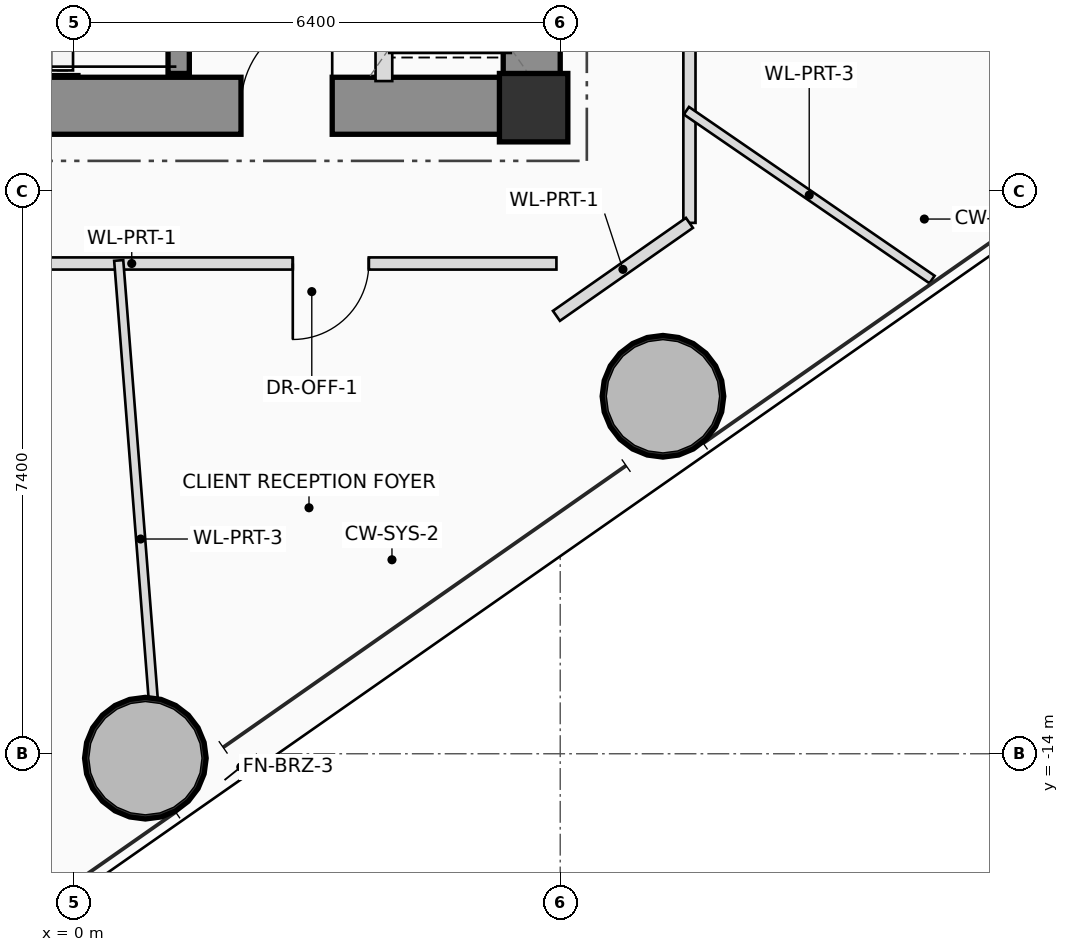
"""IFC4 building model, lengths in metres.
Left out: names, types, materials, properties, quantities, classifications, styles, units other than length and angle.
Written with IfcOpenShell. Run it as: python <this file> out.ifc"""

import sys

from ifc_helpers import new_model, si_unit, direction, frame, frame_2d, origin, origin_2d, place, context, subcontext, project, spatial, rectangle, hollow_circle, extrude, source, transform, mapped, element, fill, save


model = new_model("IFC4")
c1 = context("Model", 3, precision=1e-05, world=origin(), true_north=direction((0.0, 1.0)))
c2 = subcontext(c1, "Body", "Model", "MODEL_VIEW")
j1 = project(units=[si_unit("LENGTHUNIT", "METRE"), si_unit("PLANEANGLEUNIT", "RADIAN")], contexts=[c1])
p1 = place(None, origin())
s1 = spatial("IfcSite", under=j1, at=p1, CompositionType="ELEMENT")
p2 = place(p1, origin())
s2 = spatial("IfcBuilding", under=s1, at=p2, CompositionType="ELEMENT")
p3 = place(p2, frame((0.0, 0.0, 73.55)))
s3 = spatial("IfcBuildingStorey", under=s2, at=p3, CompositionType="ELEMENT", Elevation=73.55)
m1 = source(origin(), c2, "Body", "SweptSolid", [
    extrude(rectangle(XDim=0.9, YDim=0.9, at=origin_2d()), origin(), (0.0, 0.0, 1.0), 3.75),
])
p4 = place(p3, frame((6.05, -5.5, 0.0), z_axis=(0.0, 0.0, 1.0), x_axis=(1.0, 0.0, 0.0)))
e1 = element("IfcColumn", 1, at=p4, inside=s3, PredefinedType="COLUMN", context=c2, shape_type="MappedRepresentation", body=[
    mapped(m1, transform((0.0, 0.0, 0.0), scale=1.0)),
])
p5 = place(p3, frame((-6.4, -5.475, 0.0), z_axis=(0.0, 0.0, 1.0), x_axis=(1.0, 0.0, 0.0)))
e2 = element("IfcWall", 2, at=p5, inside=s3, PredefinedType="SHEAR", context=c2, shape_type="SweptSolid", body=[
    extrude(rectangle(XDim=12.8, YDim=0.75, at=frame_2d((6.4, 0.0))), origin(), (0.0, 0.0, 1.0), 3.75),
])
p6 = place(p5, frame((8.6, 0.0, 0.0)))
e3 = element("IfcOpeningElement", 3, at=p6, cuts=e2, PredefinedType="OPENING", context=c2, shape_type="SweptSolid", body=[
    extrude(rectangle(XDim=1.2, YDim=2.2, at=frame_2d((0.6, 1.1))), frame((0.0, 0.385, 0.0), z_axis=(0.0, -1.0, 0.0), x_axis=(1.0, 0.0, 0.0)), (0.0, 0.0, 1.0), 0.77),
])
p7 = place(p3, frame((6.025, -5.1, 0.0), z_axis=(0.0, 0.0, 1.0), x_axis=(0.0, 1.0, 0.0)))
e4 = element("IfcWall", 4, at=p7, inside=s3, PredefinedType="SHEAR", context=c2, shape_type="SweptSolid", body=[
    extrude(rectangle(XDim=10.2, YDim=0.75, at=frame_2d((5.1, 0.0))), origin(), (0.0, 0.0, 1.0), 3.75),
])
p8 = place(p3, frame((1.38, -5.05, 0.0), z_axis=(0.0, 0.0, 1.0), x_axis=(0.0, 1.0, 0.0)))
e5 = element("IfcWall", 5, at=p8, inside=s3, PredefinedType="SHEAR", context=c2, shape_type="SweptSolid", body=[
    extrude(rectangle(XDim=0.8, YDim=0.28, at=frame_2d((0.4, 0.0))), origin(), (0.0, 0.0, 1.0), 3.75),
])
m2 = source(origin(), c2, "Body", "SweptSolid", [
    extrude(hollow_circle(Radius=0.8, WallThickness=0.055, at=origin_2d()), origin(), (0.0, 0.0, 1.0), 3.75),
])
for number, where, z_axis, x_axis in (
    (6, (0.942, -14.058, 0.0), (0.0, 0.0, 1.0), (1.0, 0.0, 0.0)),
    (7, (7.752, -9.297, 0.0), (0.0, 0.0, 1.0), (1.0, 0.0, 0.0)),
):
    element("IfcColumn", number, at=place(p3, frame(where, z_axis=z_axis, x_axis=x_axis)), inside=s3, PredefinedType="COLUMN", context=c2, shape_type="MappedRepresentation", body=[
        mapped(m2, transform((0.0, 0.0, 0.0), scale=1.0)),
    ])
p9 = place(p3, frame((4.08, -5.15, 0.0), z_axis=(0.0, 0.0, 1.0), x_axis=(0.0, 1.0, 0.0)))
e8 = element("IfcWall", 8, at=p9, inside=s3, PredefinedType="PLUMBINGWALL", context=c2, shape_type="SweptSolid", body=[
    extrude(rectangle(XDim=2.95, YDim=0.22, at=frame_2d((1.475, 0.0))), origin(), (0.0, 0.0, 1.0), 3.545),
])
p10 = place(p9, frame((0.95, 0.0, 0.0)))
e9 = element("IfcOpeningElement", 9, at=p10, cuts=e8, PredefinedType="OPENING", context=c2, shape_type="SweptSolid", body=[
    extrude(rectangle(XDim=1.2, YDim=2.25, at=frame_2d((0.6, 1.125))), frame((0.0, 0.12, 0.0), z_axis=(0.0, -1.0, 0.0), x_axis=(1.0, 0.0, 0.0)), (0.0, 0.0, 1.0), 0.24),
])
p11 = place(p3, frame((8.1, -0.02, 0.0), z_axis=(0.0, 0.0, 1.0), x_axis=(0.0, -1.0, 0.0)))
e10 = element("IfcWall", 10, at=p11, inside=s3, PredefinedType="PARTITIONING", context=c2, shape_type="SweptSolid", body=[
    extrude(rectangle(XDim=6.995, YDim=0.16, at=frame_2d((3.498, 0.0))), origin(), (0.0, 0.0, 1.0), 2.85),
])
p12 = place(p3, frame((8.1, -7.015, 0.0), z_axis=(0.0, 0.0, 1.0), x_axis=(-0.81953260104, -0.573032560883, 0.0)))
e11 = element("IfcWall", 11, at=p12, inside=s3, PredefinedType="PARTITIONING", context=c2, shape_type="SweptSolid", body=[
    extrude(rectangle(XDim=2.135, YDim=0.16, at=frame_2d((1.068, 0.0))), origin(), (0.0, 0.0, 1.0), 2.85),
])
p13 = place(p3, frame((6.35, -7.55, 0.0), z_axis=(0.0, 0.0, 1.0), x_axis=(-1.0, 0.0, 0.0)))
e12 = element("IfcWall", 12, at=p13, inside=s3, PredefinedType="PARTITIONING", context=c2, shape_type="SweptSolid", body=[
    extrude(rectangle(XDim=12.7, YDim=0.16, at=frame_2d((6.35, 0.0))), origin(), (0.0, 0.0, 1.0), 2.85),
])
p14 = place(p13, frame((2.469, 0.0, 0.0)))
e13 = element("IfcOpeningElement", 13, at=p14, cuts=e12, PredefinedType="OPENING", context=c2, shape_type="SweptSolid", body=[
    extrude(rectangle(XDim=1.0, YDim=2.25, at=frame_2d((0.5, 1.125))), frame((0.0, 0.09, 0.0), z_axis=(0.0, -1.0, 0.0), x_axis=(1.0, 0.0, 0.0)), (0.0, 0.0, 1.0), 0.18),
])
p15 = place(p13, frame((7.707, 0.0, 0.0)))
e14 = element("IfcOpeningElement", 14, at=p15, cuts=e12, PredefinedType="OPENING", context=c2, shape_type="SweptSolid", body=[
    extrude(rectangle(XDim=1.0, YDim=2.25, at=frame_2d((0.5, 1.125))), frame((0.0, 0.09, 0.0), z_axis=(0.0, -1.0, 0.0), x_axis=(1.0, 0.0, 0.0)), (0.0, 0.0, 1.0), 0.18),
])
p16 = place(p3, frame((0.591, -7.51, 0.0), z_axis=(0.0, 0.0, 1.0), x_axis=(0.078466268921, -0.996916769165, 0.0)))
e15 = element("IfcWall", 15, at=p16, inside=s3, PredefinedType="PARTITIONING", context=c2, shape_type="SweptSolid", body=[
    extrude(rectangle(XDim=7.352, YDim=0.12, at=frame_2d((3.676, 0.0))), origin(), (0.0, 0.0, 1.0), 3.05),
])
p17 = place(p3, frame((8.06, -5.54, 0.0), z_axis=(0.0, 0.0, 1.0), x_axis=(0.824103676806, -0.566438990426, 0.0)))
e16 = element("IfcWall", 16, at=p17, inside=s3, PredefinedType="PARTITIONING", context=c2, shape_type="SweptSolid", body=[
    extrude(rectangle(XDim=3.922, YDim=0.12, at=frame_2d((1.961, 0.0))), origin(), (0.0, 0.0, 1.0), 3.01),
])
p18 = place(p6, origin())
e17 = element("IfcDoor", 17, at=p18, inside=s3, OperationType="SINGLE_SWING_RIGHT", PredefinedType="DOOR", context=c2, shape_type="SweptSolid", body=[
    extrude(rectangle(XDim=1.2, YDim=2.2, at=frame_2d((0.6, 1.1))), frame((0.0, 0.025, 0.0), z_axis=(0.0, -1.0, 0.0), x_axis=(1.0, 0.0, 0.0)), (0.0, 0.0, 1.0), 0.05),
])
fill(e3, e17)
p19 = place(p14, origin())
e18 = element("IfcDoor", 18, at=p19, inside=s3, OperationType="SINGLE_SWING_RIGHT", PredefinedType="DOOR", context=c2, shape_type="SweptSolid", body=[
    extrude(rectangle(XDim=1.0, YDim=2.25, at=frame_2d((0.5, 1.125))), frame((0.0, 0.025, 0.0), z_axis=(0.0, -1.0, 0.0), x_axis=(1.0, 0.0, 0.0)), (0.0, 0.0, 1.0), 0.05),
])
fill(e13, e18)
save(model, sys.argv[1])
